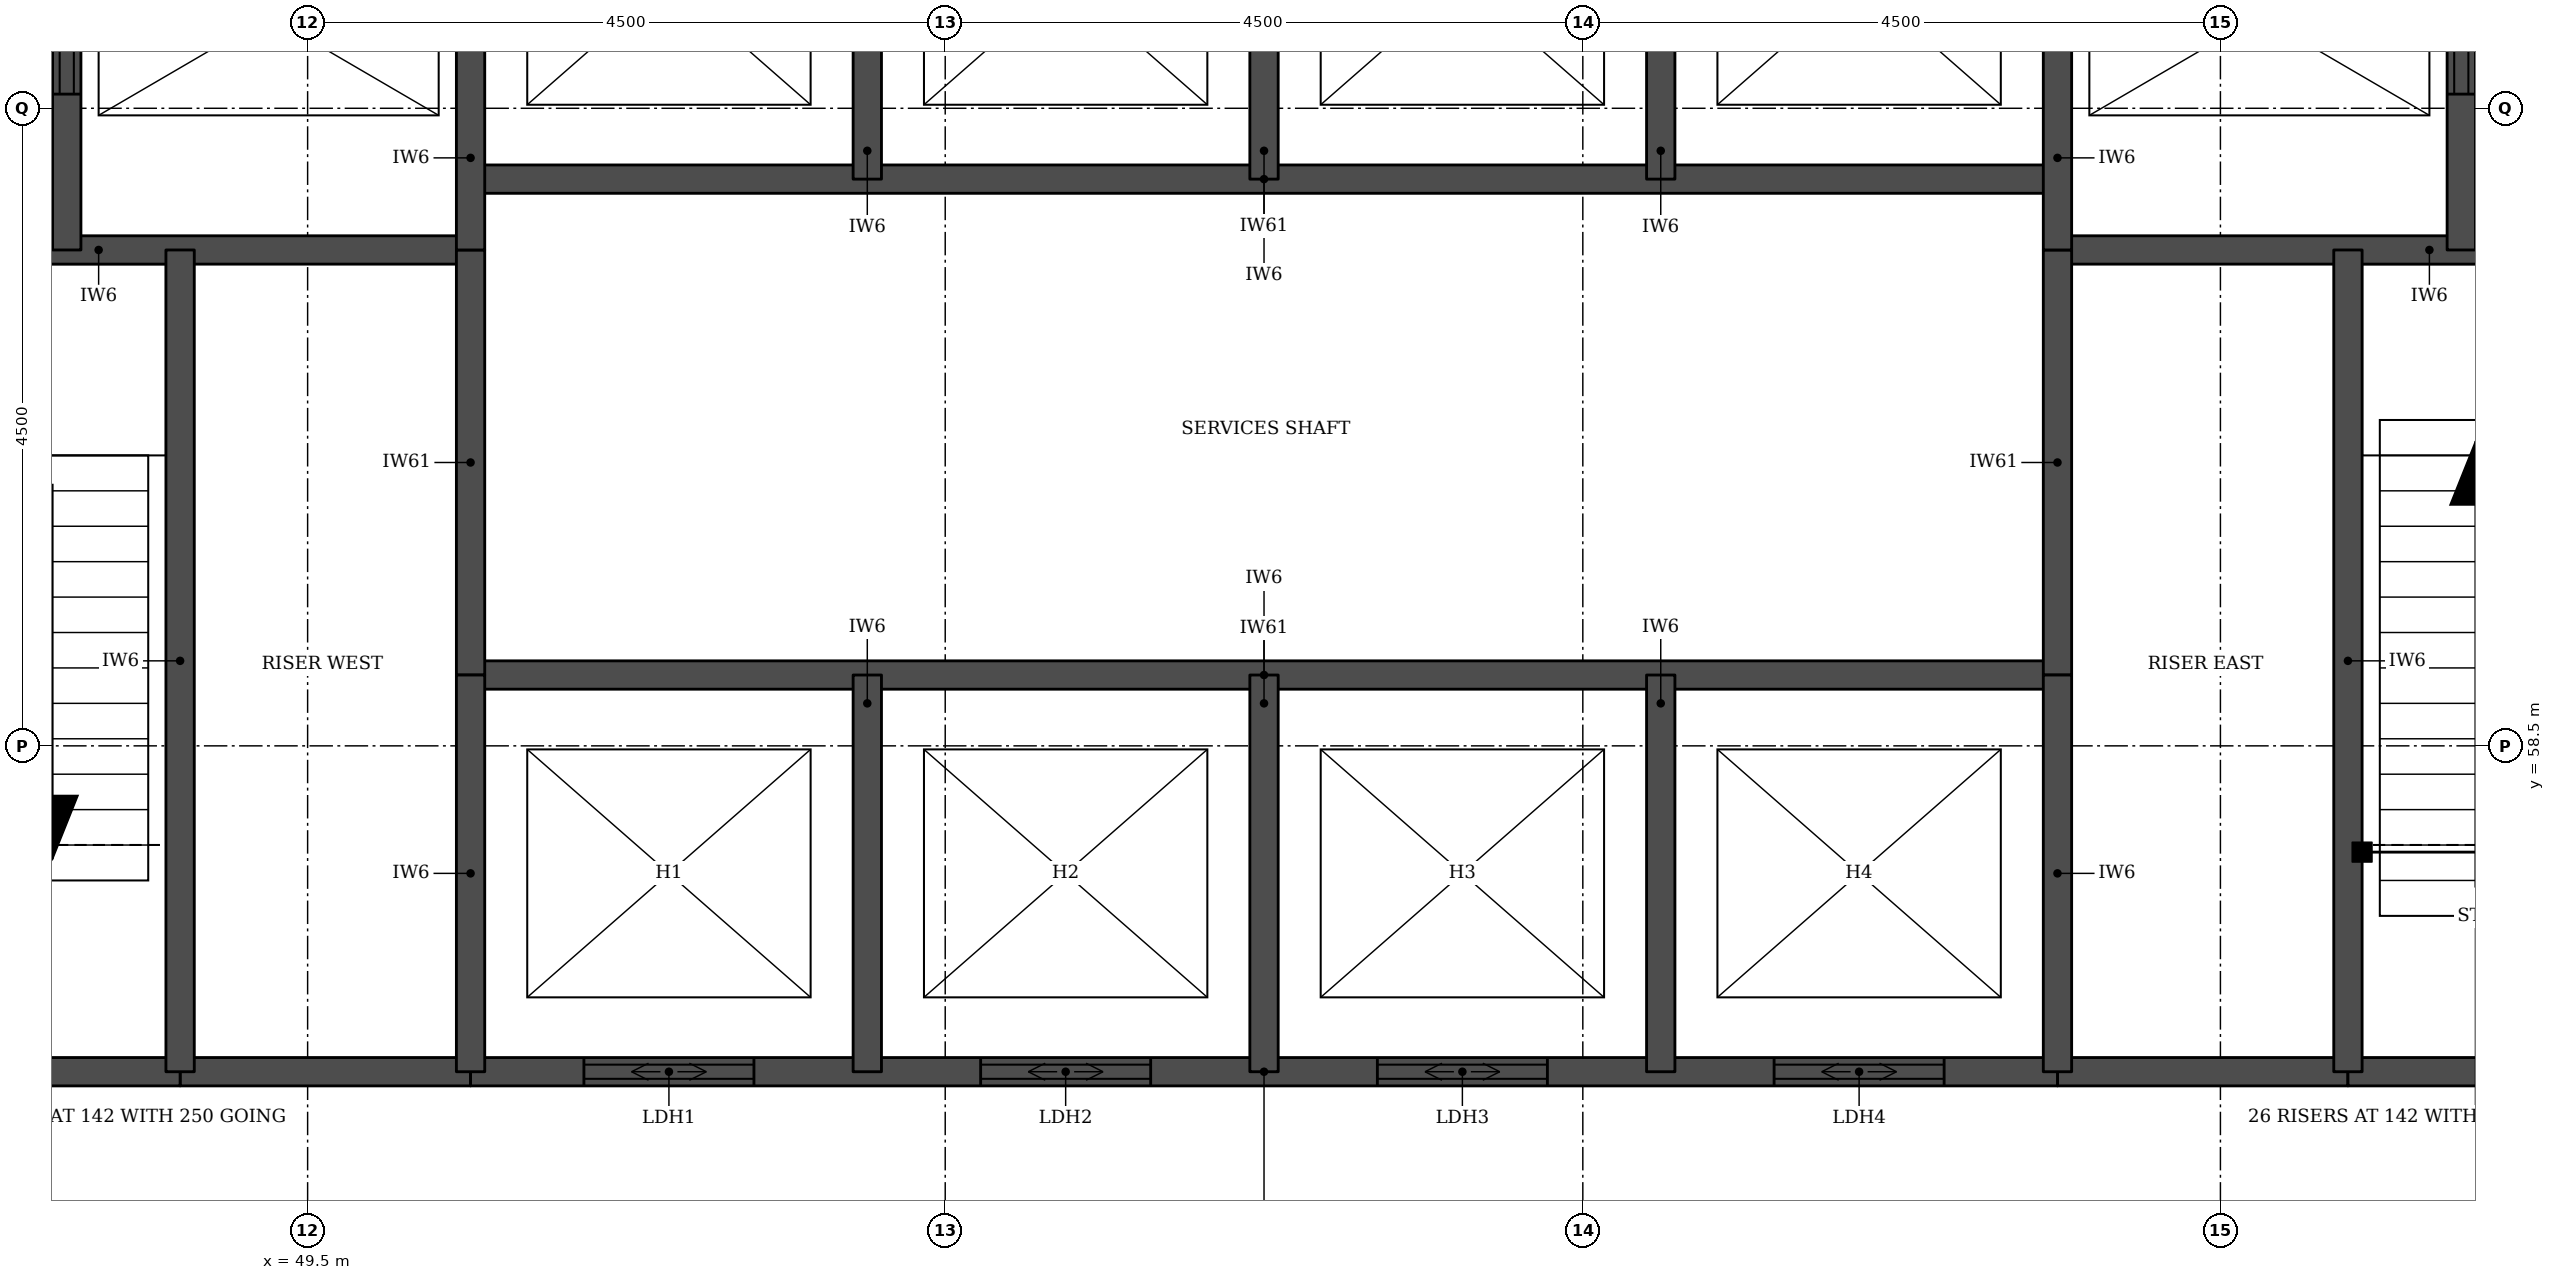
"""IFC4 building model, lengths in metres.
Left out: names, types, materials, properties, quantities, classifications, styles, units other than length and angle.
Written with IfcOpenShell. Run it as: python <this file> out.ifc"""

import sys

from ifc_helpers import new_model, si_unit, direction, frame, frame_2d, origin, place, context, subcontext, project, spatial, rectangle, extrude, element, fill, save


model = new_model("IFC4")
c1 = context("Model", 3, precision=1e-05, world=origin(), true_north=direction((0.0, 1.0)))
c2 = subcontext(c1, "Body", "Model", "MODEL_VIEW")
j1 = project(units=[si_unit("LENGTHUNIT", "METRE"), si_unit("PLANEANGLEUNIT", "RADIAN")], contexts=[c1])
p1 = place(None, origin())
s1 = spatial("IfcSite", under=j1, at=p1, CompositionType="ELEMENT")
p2 = place(p1, origin())
s2 = spatial("IfcBuilding", under=s1, at=p2, CompositionType="ELEMENT")
p3 = place(p2, frame((0.0, 0.0, 245.2)))
s3 = spatial("IfcBuildingStorey", under=s2, at=p3, CompositionType="ELEMENT", Elevation=245.2)
for number, where, z_axis, x_axis in (
    (1, (48.6, 56.2, 0.0), (0.0, 0.0, 1.0), (1.0, 0.0, 0.0)),
    (2, (61.85, 56.2, 0.0), (0.0, 0.0, 1.0), (1.0, 0.0, 0.0)),
):
    element("IfcWall", number, at=place(p3, frame(where, z_axis=z_axis, x_axis=x_axis)), inside=s3, PredefinedType="SOLIDWALL", context=c2, shape_type="SweptSolid", body=[
        extrude(rectangle(XDim=2.05, YDim=0.2, at=frame_2d((1.025, 0.0))), origin(), (0.0, 0.0, 1.0), 3.55),
    ])
p4 = place(p3, frame((45.4, 56.2, 0.0), z_axis=(0.0, 0.0, 1.0), x_axis=(1.0, 0.0, 0.0)))
e3 = element("IfcWall", 3, at=p4, inside=s3, PredefinedType="SOLIDWALL", context=c2, shape_type="SweptSolid", body=[
    extrude(rectangle(XDim=3.2, YDim=0.2, at=frame_2d((1.6, 0.0))), origin(), (0.0, 0.0, 1.0), 3.55),
])
p5 = place(p3, frame((50.65, 56.2, 0.0), z_axis=(0.0, 0.0, 1.0), x_axis=(1.0, 0.0, 0.0)))
e4 = element("IfcWall", 4, at=p5, inside=s3, PredefinedType="SOLIDWALL", context=c2, shape_type="SweptSolid", body=[
    extrude(rectangle(XDim=11.2, YDim=0.2, at=frame_2d((5.6, 0.0))), origin(), (0.0, 0.0, 1.0), 3.55),
])
p6 = place(p5, frame((0.8, 0.0, 0.0)))
e5 = element("IfcOpeningElement", 5, at=p6, cuts=e4, PredefinedType="OPENING", context=c2, shape_type="SweptSolid", body=[
    extrude(rectangle(XDim=1.2, YDim=2.1, at=frame_2d((0.6, 1.05))), frame((0.0, 0.11, 0.0), z_axis=(0.0, -1.0, 0.0), x_axis=(1.0, 0.0, 0.0)), (0.0, 0.0, 1.0), 0.22),
])
p7 = place(p5, frame((3.6, 0.0, 0.0)))
e6 = element("IfcOpeningElement", 6, at=p7, cuts=e4, PredefinedType="OPENING", context=c2, shape_type="SweptSolid", body=[
    extrude(rectangle(XDim=1.2, YDim=2.1, at=frame_2d((0.6, 1.05))), frame((0.0, 0.11, 0.0), z_axis=(0.0, -1.0, 0.0), x_axis=(1.0, 0.0, 0.0)), (0.0, 0.0, 1.0), 0.22),
])
p8 = place(p5, frame((6.4, 0.0, 0.0)))
e7 = element("IfcOpeningElement", 7, at=p8, cuts=e4, PredefinedType="OPENING", context=c2, shape_type="SweptSolid", body=[
    extrude(rectangle(XDim=1.2, YDim=2.1, at=frame_2d((0.6, 1.05))), frame((0.0, 0.11, 0.0), z_axis=(0.0, -1.0, 0.0), x_axis=(1.0, 0.0, 0.0)), (0.0, 0.0, 1.0), 0.22),
])
p9 = place(p5, frame((9.2, 0.0, 0.0)))
e8 = element("IfcOpeningElement", 8, at=p9, cuts=e4, PredefinedType="OPENING", context=c2, shape_type="SweptSolid", body=[
    extrude(rectangle(XDim=1.2, YDim=2.1, at=frame_2d((0.6, 1.05))), frame((0.0, 0.11, 0.0), z_axis=(0.0, -1.0, 0.0), x_axis=(1.0, 0.0, 0.0)), (0.0, 0.0, 1.0), 0.22),
])
p10 = place(p3, frame((63.9, 56.2, 0.0), z_axis=(0.0, 0.0, 1.0), x_axis=(1.0, 0.0, 0.0)))
e9 = element("IfcWall", 9, at=p10, inside=s3, PredefinedType="SOLIDWALL", context=c2, shape_type="SweptSolid", body=[
    extrude(rectangle(XDim=3.2, YDim=0.2, at=frame_2d((1.6, 0.0))), origin(), (0.0, 0.0, 1.0), 3.55),
])
p11 = place(p3, frame((50.65, 59.0, 0.0), z_axis=(0.0, 0.0, 1.0), x_axis=(1.0, 0.0, 0.0)))
e10 = element("IfcWall", 10, at=p11, inside=s3, PredefinedType="SOLIDWALL", context=c2, shape_type="SweptSolid", body=[
    extrude(rectangle(XDim=11.2, YDim=0.2, at=frame_2d((5.6, 0.0))), origin(), (0.0, 0.0, 1.0), 3.7),
])
for number, where, z_axis, x_axis in (
    (11, (45.4, 62.0, 0.0), (0.0, 0.0, 1.0), (1.0, 0.0, 0.0)),
    (12, (61.85, 62.0, 0.0), (0.0, 0.0, 1.0), (1.0, 0.0, 0.0)),
):
    element("IfcWall", number, at=place(p3, frame(where, z_axis=z_axis, x_axis=x_axis)), inside=s3, PredefinedType="SOLIDWALL", context=c2, shape_type="SweptSolid", body=[
        extrude(rectangle(XDim=5.25, YDim=0.2, at=frame_2d((2.625, 0.0))), origin(), (0.0, 0.0, 1.0), 3.55),
    ])
p12 = place(p3, frame((50.65, 62.5, 0.0), z_axis=(0.0, 0.0, 1.0), x_axis=(1.0, 0.0, 0.0)))
e13 = element("IfcWall", 13, at=p12, inside=s3, PredefinedType="SOLIDWALL", context=c2, shape_type="SweptSolid", body=[
    extrude(rectangle(XDim=11.2, YDim=0.2, at=frame_2d((5.6, 0.0))), origin(), (0.0, 0.0, 1.0), 3.7),
])
p13 = place(p3, frame((47.8, 62.0, 0.0), z_axis=(0.0, 0.0, 1.0), x_axis=(0.0, 1.0, 0.0)))
e14 = element("IfcWall", 14, at=p13, inside=s3, PredefinedType="SOLIDWALL", context=c2, shape_type="SweptSolid", body=[
    extrude(rectangle(XDim=3.3, YDim=0.2, at=frame_2d((1.65, 0.0))), origin(), (0.0, 0.0, 1.0), 3.55),
])
p14 = place(p13, frame((1.1, 0.0, 0.0)))
e15 = element("IfcOpeningElement", 15, at=p14, cuts=e14, PredefinedType="OPENING", context=c2, shape_type="SweptSolid", body=[
    extrude(rectangle(XDim=1.1, YDim=2.1, at=frame_2d((0.55, 1.05))), frame((0.0, 0.11, 0.0), z_axis=(0.0, -1.0, 0.0), x_axis=(1.0, 0.0, 0.0)), (0.0, 0.0, 1.0), 0.22),
])
p15 = place(p3, frame((48.6, 56.2, 0.0), z_axis=(0.0, 0.0, 1.0), x_axis=(0.0, 1.0, 0.0)))
e16 = element("IfcWall", 16, at=p15, inside=s3, PredefinedType="SOLIDWALL", context=c2, shape_type="SweptSolid", body=[
    extrude(rectangle(XDim=5.8, YDim=0.2, at=frame_2d((2.9, 0.0))), origin(), (0.0, 0.0, 1.0), 3.55),
])
p16 = place(p3, frame((50.65, 59.0, 0.0), z_axis=(0.0, 0.0, 1.0), x_axis=(0.0, 1.0, 0.0)))
e17 = element("IfcWall", 17, at=p16, inside=s3, PredefinedType="SOLIDWALL", context=c2, shape_type="SweptSolid", body=[
    extrude(rectangle(XDim=3.0, YDim=0.2, at=frame_2d((1.5, 0.0))), origin(), (0.0, 0.0, 1.0), 3.7),
])
p17 = place(p3, frame((50.65, 56.2, 0.0), z_axis=(0.0, 0.0, 1.0), x_axis=(0.0, 1.0, 0.0)))
e18 = element("IfcWall", 18, at=p17, inside=s3, PredefinedType="SOLIDWALL", context=c2, shape_type="SweptSolid", body=[
    extrude(rectangle(XDim=2.8, YDim=0.2, at=frame_2d((1.4, 0.0))), origin(), (0.0, 0.0, 1.0), 3.55),
])
p18 = place(p3, frame((50.65, 62.0, 0.0), z_axis=(0.0, 0.0, 1.0), x_axis=(0.0, 1.0, 0.0)))
e19 = element("IfcWall", 19, at=p18, inside=s3, PredefinedType="SOLIDWALL", context=c2, shape_type="SweptSolid", body=[
    extrude(rectangle(XDim=3.3, YDim=0.2, at=frame_2d((1.65, 0.0))), origin(), (0.0, 0.0, 1.0), 3.55),
])
for number, where, z_axis, x_axis in (
    (20, (53.45, 56.2, 0.0), (0.0, 0.0, 1.0), (0.0, 1.0, 0.0)),
    (21, (53.45, 62.5, 0.0), (0.0, 0.0, 1.0), (0.0, 1.0, 0.0)),
    (22, (56.25, 56.2, 0.0), (0.0, 0.0, 1.0), (0.0, 1.0, 0.0)),
    (23, (56.25, 62.5, 0.0), (0.0, 0.0, 1.0), (0.0, 1.0, 0.0)),
    (24, (59.05, 56.2, 0.0), (0.0, 0.0, 1.0), (0.0, 1.0, 0.0)),
    (25, (59.05, 62.5, 0.0), (0.0, 0.0, 1.0), (0.0, 1.0, 0.0)),
):
    element("IfcWall", number, at=place(p3, frame(where, z_axis=z_axis, x_axis=x_axis)), inside=s3, PredefinedType="SOLIDWALL", context=c2, shape_type="SweptSolid", body=[
        extrude(rectangle(XDim=2.8, YDim=0.2, at=frame_2d((1.4, 0.0))), origin(), (0.0, 0.0, 1.0), 3.55),
    ])
p19 = place(p3, frame((61.85, 59.0, 0.0), z_axis=(0.0, 0.0, 1.0), x_axis=(0.0, 1.0, 0.0)))
e26 = element("IfcWall", 26, at=p19, inside=s3, PredefinedType="SOLIDWALL", context=c2, shape_type="SweptSolid", body=[
    extrude(rectangle(XDim=3.0, YDim=0.2, at=frame_2d((1.5, 0.0))), origin(), (0.0, 0.0, 1.0), 3.7),
])
p20 = place(p3, frame((61.85, 56.2, 0.0), z_axis=(0.0, 0.0, 1.0), x_axis=(0.0, 1.0, 0.0)))
e27 = element("IfcWall", 27, at=p20, inside=s3, PredefinedType="SOLIDWALL", context=c2, shape_type="SweptSolid", body=[
    extrude(rectangle(XDim=2.8, YDim=0.2, at=frame_2d((1.4, 0.0))), origin(), (0.0, 0.0, 1.0), 3.55),
])
p21 = place(p3, frame((61.85, 62.0, 0.0), z_axis=(0.0, 0.0, 1.0), x_axis=(0.0, 1.0, 0.0)))
e28 = element("IfcWall", 28, at=p21, inside=s3, PredefinedType="SOLIDWALL", context=c2, shape_type="SweptSolid", body=[
    extrude(rectangle(XDim=3.3, YDim=0.2, at=frame_2d((1.65, 0.0))), origin(), (0.0, 0.0, 1.0), 3.55),
])
p22 = place(p3, frame((63.9, 56.2, 0.0), z_axis=(0.0, 0.0, 1.0), x_axis=(0.0, 1.0, 0.0)))
e29 = element("IfcWall", 29, at=p22, inside=s3, PredefinedType="SOLIDWALL", context=c2, shape_type="SweptSolid", body=[
    extrude(rectangle(XDim=5.8, YDim=0.2, at=frame_2d((2.9, 0.0))), origin(), (0.0, 0.0, 1.0), 3.55),
])
p23 = place(p3, frame((64.7, 62.0, 0.0), z_axis=(0.0, 0.0, 1.0), x_axis=(0.0, 1.0, 0.0)))
e30 = element("IfcWall", 30, at=p23, inside=s3, PredefinedType="SOLIDWALL", context=c2, shape_type="SweptSolid", body=[
    extrude(rectangle(XDim=3.3, YDim=0.2, at=frame_2d((1.65, 0.0))), origin(), (0.0, 0.0, 1.0), 3.55),
])
p24 = place(p23, frame((1.1, 0.0, 0.0)))
e31 = element("IfcOpeningElement", 31, at=p24, cuts=e30, PredefinedType="OPENING", context=c2, shape_type="SweptSolid", body=[
    extrude(rectangle(XDim=1.1, YDim=2.1, at=frame_2d((0.55, 1.05))), frame((0.0, 0.11, 0.0), z_axis=(0.0, -1.0, 0.0), x_axis=(1.0, 0.0, 0.0)), (0.0, 0.0, 1.0), 0.22),
])
p25 = place(p6, origin())
e32 = element("IfcDoor", 32, at=p25, inside=s3, OperationType="DOUBLE_DOOR_SLIDING", PredefinedType="DOOR", context=c2, shape_type="SweptSolid", body=[
    extrude(rectangle(XDim=1.2, YDim=2.1, at=frame_2d((0.6, 1.05))), frame((0.0, 0.025, 0.0), z_axis=(0.0, -1.0, 0.0), x_axis=(1.0, 0.0, 0.0)), (0.0, 0.0, 1.0), 0.05),
])
fill(e5, e32)
p26 = place(p7, origin())
e33 = element("IfcDoor", 33, at=p26, inside=s3, OperationType="DOUBLE_DOOR_SLIDING", PredefinedType="DOOR", context=c2, shape_type="SweptSolid", body=[
    extrude(rectangle(XDim=1.2, YDim=2.1, at=frame_2d((0.6, 1.05))), frame((0.0, 0.025, 0.0), z_axis=(0.0, -1.0, 0.0), x_axis=(1.0, 0.0, 0.0)), (0.0, 0.0, 1.0), 0.05),
])
fill(e6, e33)
p27 = place(p8, origin())
e34 = element("IfcDoor", 34, at=p27, inside=s3, OperationType="DOUBLE_DOOR_SLIDING", PredefinedType="DOOR", context=c2, shape_type="SweptSolid", body=[
    extrude(rectangle(XDim=1.2, YDim=2.1, at=frame_2d((0.6, 1.05))), frame((0.0, 0.025, 0.0), z_axis=(0.0, -1.0, 0.0), x_axis=(1.0, 0.0, 0.0)), (0.0, 0.0, 1.0), 0.05),
])
fill(e7, e34)
p28 = place(p9, origin())
e35 = element("IfcDoor", 35, at=p28, inside=s3, OperationType="DOUBLE_DOOR_SLIDING", PredefinedType="DOOR", context=c2, shape_type="SweptSolid", body=[
    extrude(rectangle(XDim=1.2, YDim=2.1, at=frame_2d((0.6, 1.05))), frame((0.0, 0.025, 0.0), z_axis=(0.0, -1.0, 0.0), x_axis=(1.0, 0.0, 0.0)), (0.0, 0.0, 1.0), 0.05),
])
fill(e8, e35)
p29 = place(p14, origin())
e36 = element("IfcDoor", 36, at=p29, inside=s3, OperationType="DOUBLE_DOOR_SLIDING", PredefinedType="DOOR", context=c2, shape_type="SweptSolid", body=[
    extrude(rectangle(XDim=1.1, YDim=2.1, at=frame_2d((0.55, 1.05))), frame((0.0, 0.025, 0.0), z_axis=(0.0, -1.0, 0.0), x_axis=(1.0, 0.0, 0.0)), (0.0, 0.0, 1.0), 0.05),
])
fill(e15, e36)
p30 = place(p24, origin())
e37 = element("IfcDoor", 37, at=p30, inside=s3, OperationType="DOUBLE_DOOR_SLIDING", PredefinedType="DOOR", context=c2, shape_type="SweptSolid", body=[
    extrude(rectangle(XDim=1.1, YDim=2.1, at=frame_2d((0.55, 1.05))), frame((0.0, 0.025, 0.0), z_axis=(0.0, -1.0, 0.0), x_axis=(1.0, 0.0, 0.0)), (0.0, 0.0, 1.0), 0.05),
])
fill(e31, e37)
save(model, sys.argv[1])
